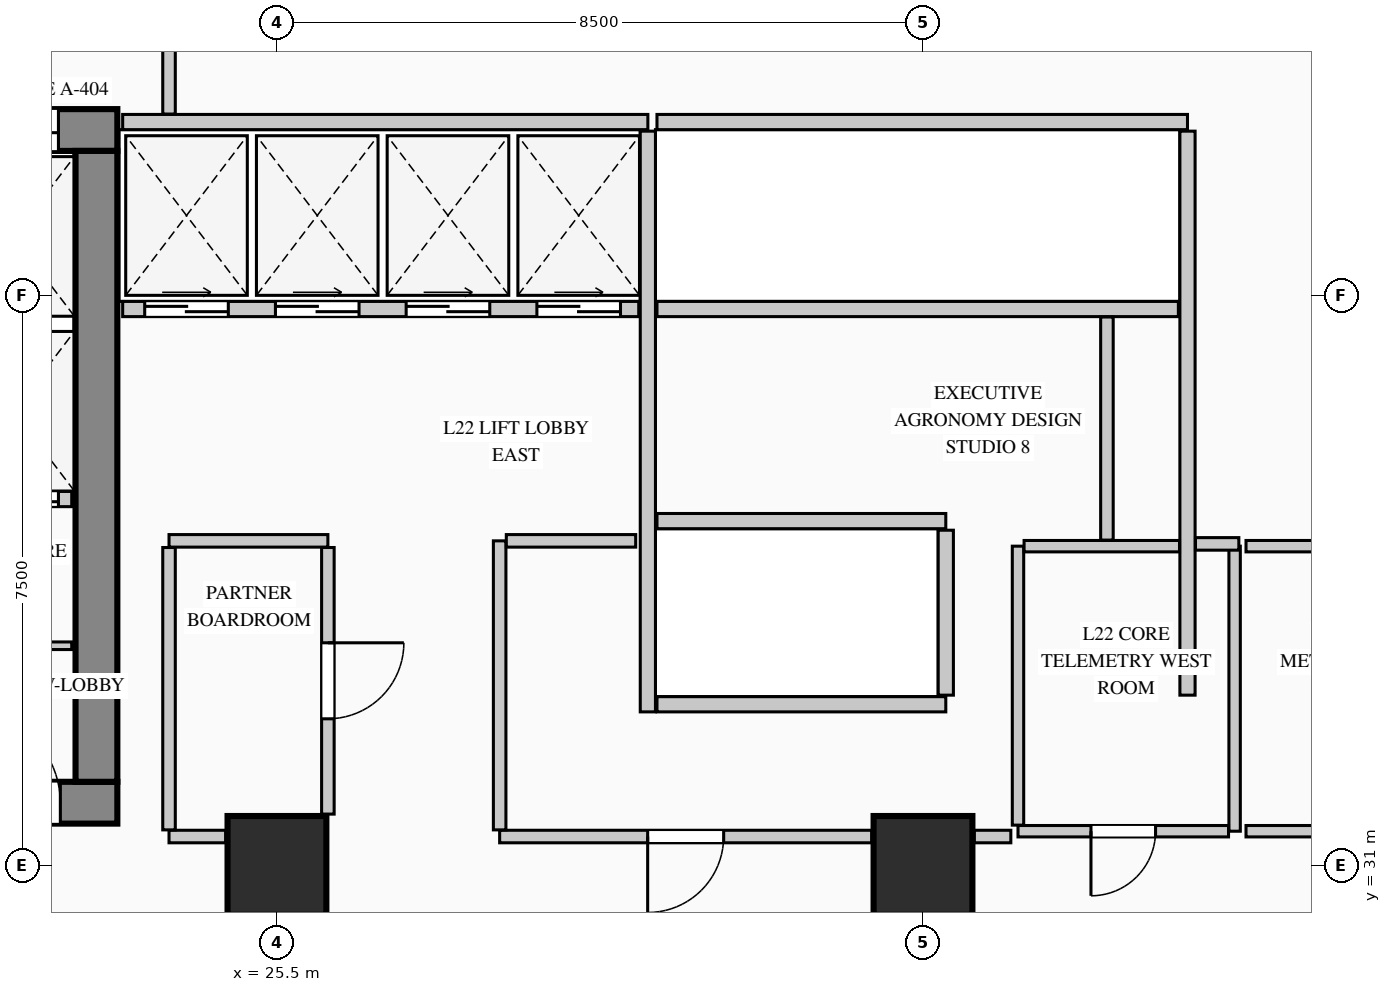
"""IFC4 building model, lengths in metres.
Left out: names, types, materials, properties, quantities, classifications, styles, units other than length and angle.
Written with IfcOpenShell. Run it as: python <this file> out.ifc"""

import sys

from ifc_helpers import new_model, si_unit, direction, frame, frame_2d, origin, origin_2d, place, context, subcontext, project, spatial, rectangle, extrude, element, fill, save


model = new_model("IFC4")
c1 = context("Model", 3, precision=1e-05, world=origin(), true_north=direction((0.0, 1.0)))
c2 = subcontext(c1, "Body", "Model", "MODEL_VIEW")
j1 = project(units=[si_unit("LENGTHUNIT", "METRE"), si_unit("PLANEANGLEUNIT", "RADIAN")], contexts=[c1])
p1 = place(None, origin())
s1 = spatial("IfcSite", under=j1, at=p1, CompositionType="ELEMENT")
p2 = place(p1, origin())
s2 = spatial("IfcBuilding", under=s1, at=p2, CompositionType="ELEMENT")
p3 = place(p2, frame((0.0, 0.0, 97.4)))
s3 = spatial("IfcBuildingStorey", under=s2, at=p3, CompositionType="ELEMENT", Elevation=97.4)
p4 = place(p3, frame((5.45, 40.675, 0.0), z_axis=(0.0, 0.0, 1.0), x_axis=(1.0, 0.0, 0.0)))
e1 = element("IfcWall", 1, at=p4, inside=s3, PredefinedType="SHEAR", context=c2, shape_type="SweptSolid", body=[
    extrude(rectangle(XDim=17.95, YDim=0.55, at=frame_2d((8.975, 0.0))), origin(), (0.0, 0.0, 1.0), 4.4),
])
p5 = place(p4, frame((15.995, 0.0, 0.0)))
e2 = element("IfcOpeningElement", 2, at=p5, cuts=e1, PredefinedType="OPENING", context=c2, shape_type="SweptSolid", body=[
    extrude(rectangle(XDim=1.18, YDim=2.25, at=frame_2d((0.59, 1.125))), frame((0.0, 0.285, 0.0), z_axis=(0.0, -1.0, 0.0), x_axis=(1.0, 0.0, 0.0)), (0.0, 0.0, 1.0), 0.57),
])
p6 = place(p3, frame((5.45, 31.825, 0.0), z_axis=(0.0, 0.0, 1.0), x_axis=(1.0, 0.0, 0.0)))
e3 = element("IfcWall", 3, at=p6, inside=s3, PredefinedType="SHEAR", context=c2, shape_type="SweptSolid", body=[
    extrude(rectangle(XDim=17.95, YDim=0.55, at=frame_2d((8.975, 0.0))), origin(), (0.0, 0.0, 1.0), 4.4),
])
p7 = place(p6, frame((3.2, 0.0, 0.0)))
e4 = element("IfcOpeningElement", 4, at=p7, cuts=e3, PredefinedType="OPENING", context=c2, shape_type="SweptSolid", body=[
    extrude(rectangle(XDim=1.2, YDim=2.2, at=frame_2d((0.6, 1.1))), frame((0.0, 0.285, 0.0), z_axis=(0.0, -1.0, 0.0), x_axis=(1.0, 0.0, 0.0)), (0.0, 0.0, 1.0), 0.57),
])
p8 = place(p6, frame((7.05, 0.0, 0.0)))
e5 = element("IfcOpeningElement", 5, at=p8, cuts=e3, PredefinedType="OPENING", context=c2, shape_type="SweptSolid", body=[
    extrude(rectangle(XDim=1.2, YDim=2.2, at=frame_2d((0.6, 1.1))), frame((0.0, 0.285, 0.0), z_axis=(0.0, -1.0, 0.0), x_axis=(1.0, 0.0, 0.0)), (0.0, 0.0, 1.0), 0.57),
])
p9 = place(p6, frame((8.9, 0.0, 0.0)))
e6 = element("IfcOpeningElement", 6, at=p9, cuts=e3, PredefinedType="OPENING", context=c2, shape_type="SweptSolid", body=[
    extrude(rectangle(XDim=1.15, YDim=2.2, at=frame_2d((0.575, 1.1))), frame((0.0, 0.285, 0.0), z_axis=(0.0, -1.0, 0.0), x_axis=(1.0, 0.0, 0.0)), (0.0, 0.0, 1.0), 0.57),
])
p10 = place(p6, frame((16.0, 0.0, 0.0)))
e7 = element("IfcOpeningElement", 7, at=p10, cuts=e3, PredefinedType="OPENING", context=c2, shape_type="SweptSolid", body=[
    extrude(rectangle(XDim=1.2, YDim=2.2, at=frame_2d((0.6, 1.1))), frame((0.0, 0.285, 0.0), z_axis=(0.0, -1.0, 0.0), x_axis=(1.0, 0.0, 0.0)), (0.0, 0.0, 1.0), 0.57),
])
p11 = place(p3, frame((23.125, 32.1, 0.0), z_axis=(0.0, 0.0, 1.0), x_axis=(0.0, 1.0, 0.0)))
e8 = element("IfcWall", 8, at=p11, inside=s3, PredefinedType="SHEAR", context=c2, shape_type="SweptSolid", body=[
    extrude(rectangle(XDim=8.3, YDim=0.55, at=frame_2d((4.15, 0.0))), origin(), (0.0, 0.0, 1.0), 4.4),
])
for number, where, z_axis, x_axis in (
    (9, (25.5, 31.0, 0.0), (0.0, 0.0, 1.0), (1.0, 0.0, 0.0)),
    (10, (34.0, 31.0, 0.0), (0.0, 0.0, 1.0), (1.0, 0.0, 0.0)),
):
    element("IfcColumn", number, at=place(p3, frame(where, z_axis=z_axis, x_axis=x_axis)), inside=s3, PredefinedType="COLUMN", context=c2, shape_type="SweptSolid", body=[
        extrude(rectangle(XDim=1.3, YDim=1.3, at=origin_2d()), origin(), (0.0, 0.0, 1.0), 4.4),
    ])
p12 = place(p3, frame((21.38, 33.89, 0.0), z_axis=(0.0, 0.0, 1.0), x_axis=(1.0, 0.0, 0.0)))
e11 = element("IfcWall", 11, at=p12, inside=s3, PredefinedType="PARTITIONING", context=c2, shape_type="SweptSolid", body=[
    extrude(rectangle(XDim=1.42, YDim=0.1, at=frame_2d((0.71, 0.0))), origin(), (0.0, 0.0, 1.0), 4.115),
])
p13 = place(p12, frame((0.28, 0.0, 0.0)))
e12 = element("IfcOpeningElement", 12, at=p13, cuts=e11, PredefinedType="OPENING", context=c2, shape_type="SweptSolid", body=[
    extrude(rectangle(XDim=0.85, YDim=2.1, at=frame_2d((0.425, 1.05))), frame((0.0, 0.06, 0.0), z_axis=(0.0, -1.0, 0.0), x_axis=(1.0, 0.0, 0.0)), (0.0, 0.0, 1.0), 0.12),
])
p14 = place(p3, frame((21.3, 35.82, 0.0), z_axis=(0.0, 0.0, 1.0), x_axis=(1.0, 0.0, 0.0)))
e13 = element("IfcWall", 13, at=p14, inside=s3, PredefinedType="PARTITIONING", context=c2, shape_type="SweptSolid", body=[
    extrude(rectangle(XDim=1.5, YDim=0.2, at=frame_2d((0.75, 0.0))), origin(), (0.0, 0.0, 1.0), 4.115),
])
p15 = place(p14, frame((0.145, 0.0, 0.0)))
e14 = element("IfcOpeningElement", 14, at=p15, cuts=e13, PredefinedType="OPENING", context=c2, shape_type="SweptSolid", body=[
    extrude(rectangle(XDim=1.18, YDim=2.25, at=frame_2d((0.59, 1.125))), frame((0.0, 0.11, 0.0), z_axis=(0.0, -1.0, 0.0), x_axis=(1.0, 0.0, 0.0)), (0.0, 0.0, 1.0), 0.22),
])
p16 = place(p3, frame((23.47, 40.78, 0.0), z_axis=(0.0, 0.0, 1.0), x_axis=(1.0, 0.0, 0.0)))
e15 = element("IfcWall", 15, at=p16, inside=s3, PredefinedType="PARTITIONING", context=c2, shape_type="SweptSolid", body=[
    extrude(rectangle(XDim=6.91, YDim=0.2, at=frame_2d((3.455, 0.0))), origin(), (0.0, 0.0, 1.0), 4.115),
])
p17 = place(p3, frame((30.38, 33.02, 0.0), z_axis=(0.0, 0.0, 1.0), x_axis=(0.0, 1.0, 0.0)))
e16 = element("IfcWall", 16, at=p17, inside=s3, PredefinedType="PARTITIONING", context=c2, shape_type="SweptSolid", body=[
    extrude(rectangle(XDim=7.64, YDim=0.2, at=frame_2d((3.82, 0.0))), origin(), (0.0, 0.0, 1.0), 4.115),
])
p18 = place(p3, frame((23.47, 38.32, 0.0), z_axis=(0.0, 0.0, 1.0), x_axis=(1.0, 0.0, 0.0)))
e17 = element("IfcWall", 17, at=p18, inside=s3, PredefinedType="PARTITIONING", context=c2, shape_type="SweptSolid", body=[
    extrude(rectangle(XDim=6.79, YDim=0.2, at=frame_2d((3.395, 0.0))), origin(), (0.0, 0.0, 1.0), 4.115),
])
p19 = place(p18, frame((0.29, 0.0, 0.0)))
e18 = element("IfcOpeningElement", 18, at=p19, cuts=e17, PredefinedType="OPENING", context=c2, shape_type="SweptSolid", body=[
    extrude(rectangle(XDim=1.1, YDim=2.2, at=frame_2d((0.55, 1.1))), frame((0.0, 0.11, 0.0), z_axis=(0.0, -1.0, 0.0), x_axis=(1.0, 0.0, 0.0)), (0.0, 0.0, 1.0), 0.22),
])
p20 = place(p18, frame((2.01, 0.0, 0.0)))
e19 = element("IfcOpeningElement", 19, at=p20, cuts=e17, PredefinedType="OPENING", context=c2, shape_type="SweptSolid", body=[
    extrude(rectangle(XDim=1.1, YDim=2.2, at=frame_2d((0.55, 1.1))), frame((0.0, 0.11, 0.0), z_axis=(0.0, -1.0, 0.0), x_axis=(1.0, 0.0, 0.0)), (0.0, 0.0, 1.0), 0.22),
])
p21 = place(p18, frame((3.73, 0.0, 0.0)))
e20 = element("IfcOpeningElement", 20, at=p21, cuts=e17, PredefinedType="OPENING", context=c2, shape_type="SweptSolid", body=[
    extrude(rectangle(XDim=1.1, YDim=2.2, at=frame_2d((0.55, 1.1))), frame((0.0, 0.11, 0.0), z_axis=(0.0, -1.0, 0.0), x_axis=(1.0, 0.0, 0.0)), (0.0, 0.0, 1.0), 0.22),
])
p22 = place(p18, frame((5.45, 0.0, 0.0)))
e21 = element("IfcOpeningElement", 21, at=p22, cuts=e17, PredefinedType="OPENING", context=c2, shape_type="SweptSolid", body=[
    extrude(rectangle(XDim=1.1, YDim=2.2, at=frame_2d((0.55, 1.1))), frame((0.0, 0.11, 0.0), z_axis=(0.0, -1.0, 0.0), x_axis=(1.0, 0.0, 0.0)), (0.0, 0.0, 1.0), 0.22),
])
p23 = place(p3, frame((30.5, 40.78, 0.0), z_axis=(0.0, 0.0, 1.0), x_axis=(1.0, 0.0, 0.0)))
e22 = element("IfcWall", 22, at=p23, inside=s3, PredefinedType="PARTITIONING", context=c2, shape_type="SweptSolid", body=[
    extrude(rectangle(XDim=6.98, YDim=0.2, at=frame_2d((3.49, 0.0))), origin(), (0.0, 0.0, 1.0), 4.115),
])
p24 = place(p3, frame((37.48, 33.24, 0.0), z_axis=(0.0, 0.0, 1.0), x_axis=(0.0, 1.0, 0.0)))
e23 = element("IfcWall", 23, at=p24, inside=s3, PredefinedType="PARTITIONING", context=c2, shape_type="SweptSolid", body=[
    extrude(rectangle(XDim=7.42, YDim=0.2, at=frame_2d((3.71, 0.0))), origin(), (0.0, 0.0, 1.0), 4.115),
])
p25 = place(p3, frame((30.5, 38.32, 0.0), z_axis=(0.0, 0.0, 1.0), x_axis=(1.0, 0.0, 0.0)))
e24 = element("IfcWall", 24, at=p25, inside=s3, PredefinedType="PARTITIONING", context=c2, shape_type="SweptSolid", body=[
    extrude(rectangle(XDim=6.86, YDim=0.2, at=frame_2d((3.43, 0.0))), origin(), (0.0, 0.0, 1.0), 4.115),
])
for number, where, z_axis, x_axis in (
    (25, (30.5, 35.53, 0.0), (0.0, 0.0, 1.0), (1.0, 0.0, 0.0)),
    (26, (30.5, 33.12, 0.0), (0.0, 0.0, 1.0), (1.0, 0.0, 0.0)),
):
    element("IfcWall", number, at=place(p3, frame(where, z_axis=z_axis, x_axis=x_axis)), inside=s3, PredefinedType="PARTITIONING", context=c2, shape_type="SweptSolid", body=[
        extrude(rectangle(XDim=3.8, YDim=0.2, at=frame_2d((1.9, 0.0))), origin(), (0.0, 0.0, 1.0), 4.115),
    ])
p26 = place(p3, frame((34.3, 33.24, 0.0), z_axis=(0.0, 0.0, 1.0), x_axis=(0.0, 1.0, 0.0)))
e27 = element("IfcWall", 27, at=p26, inside=s3, PredefinedType="PARTITIONING", context=c2, shape_type="SweptSolid", body=[
    extrude(rectangle(XDim=2.17, YDim=0.2, at=frame_2d((1.085, 0.0))), origin(), (0.0, 0.0, 1.0), 4.115),
])
p27 = place(p3, frame((38.1, 35.2, 0.0), z_axis=(0.0, 0.0, 1.0), x_axis=(0.0, -1.0, 0.0)))
e28 = element("IfcWall", 28, at=p27, inside=s3, PredefinedType="PARTITIONING", context=c2, shape_type="SweptSolid", body=[
    extrude(rectangle(XDim=3.75, YDim=0.15, at=frame_2d((1.875, 0.0))), origin(), (0.0, 0.0, 1.0), 4.115),
])
p28 = place(p3, frame((38.02, 31.45, 0.0), z_axis=(0.0, 0.0, 1.0), x_axis=(-1.0, 0.0, 0.0)))
e29 = element("IfcWall", 29, at=p28, inside=s3, PredefinedType="PARTITIONING", context=c2, shape_type="SweptSolid", body=[
    extrude(rectangle(XDim=2.77, YDim=0.15, at=frame_2d((1.385, 0.0))), origin(), (0.0, 0.0, 1.0), 4.115),
])
p29 = place(p28, frame((0.96, 0.0, 0.0)))
e30 = element("IfcOpeningElement", 30, at=p29, cuts=e29, PredefinedType="OPENING", context=c2, shape_type="SweptSolid", body=[
    extrude(rectangle(XDim=0.85, YDim=2.1, at=frame_2d((0.425, 1.05))), frame((0.0, 0.085, 0.0), z_axis=(0.0, -1.0, 0.0), x_axis=(1.0, 0.0, 0.0)), (0.0, 0.0, 1.0), 0.17),
])
p30 = place(p3, frame((35.25, 31.53, 0.0), z_axis=(0.0, 0.0, 1.0), x_axis=(0.0, 1.0, 0.0)))
e31 = element("IfcWall", 31, at=p30, inside=s3, PredefinedType="PARTITIONING", context=c2, shape_type="SweptSolid", body=[
    extrude(rectangle(XDim=3.67, YDim=0.15, at=frame_2d((1.835, 0.0))), origin(), (0.0, 0.0, 1.0), 4.115),
])
p31 = place(p3, frame((35.33, 35.2, 0.0), z_axis=(0.0, 0.0, 1.0), x_axis=(1.0, 0.0, 0.0)))
e32 = element("IfcWall", 32, at=p31, inside=s3, PredefinedType="PARTITIONING", context=c2, shape_type="SweptSolid", body=[
    extrude(rectangle(XDim=2.045, YDim=0.15, at=frame_2d((1.022, 0.0))), origin(), (0.0, 0.0, 1.0), 4.115),
])
p32 = place(p3, frame((41.07, 31.45, 0.0), z_axis=(0.0, 0.0, 1.0), x_axis=(-1.0, 0.0, 0.0)))
e33 = element("IfcWall", 33, at=p32, inside=s3, PredefinedType="PARTITIONING", context=c2, shape_type="SweptSolid", body=[
    extrude(rectangle(XDim=2.82, YDim=0.15, at=frame_2d((1.41, 0.0))), origin(), (0.0, 0.0, 1.0), 4.115),
])
p33 = place(p32, frame((0.985, 0.0, 0.0)))
e34 = element("IfcOpeningElement", 34, at=p33, cuts=e33, PredefinedType="OPENING", context=c2, shape_type="SweptSolid", body=[
    extrude(rectangle(XDim=0.85, YDim=2.1, at=frame_2d((0.425, 1.05))), frame((0.0, 0.085, 0.0), z_axis=(0.0, -1.0, 0.0), x_axis=(1.0, 0.0, 0.0)), (0.0, 0.0, 1.0), 0.17),
])
p34 = place(p3, frame((38.25, 35.2, 0.0), z_axis=(0.0, 0.0, 1.0), x_axis=(1.0, 0.0, 0.0)))
e35 = element("IfcWall", 35, at=p34, inside=s3, PredefinedType="PARTITIONING", context=c2, shape_type="SweptSolid", body=[
    extrude(rectangle(XDim=2.82, YDim=0.15, at=frame_2d((1.41, 0.0))), origin(), (0.0, 0.0, 1.0), 4.115),
])
p35 = place(p3, frame((24.08, 35.27, 0.0), z_axis=(0.0, 0.0, 1.0), x_axis=(1.0, 0.0, 0.0)))
e36 = element("IfcWall", 36, at=p35, inside=s3, PredefinedType="PARTITIONING", context=c2, shape_type="SweptSolid", body=[
    extrude(rectangle(XDim=2.09, YDim=0.165, at=frame_2d((1.045, 0.0))), origin(), (0.0, 0.0, 1.0), 4.115),
])
p36 = place(p3, frame((26.17, 35.183, 0.0), z_axis=(0.0, 0.0, 1.0), x_axis=(0.0, -1.0, 0.0)))
e37 = element("IfcWall", 37, at=p36, inside=s3, PredefinedType="PARTITIONING", context=c2, shape_type="SweptSolid", body=[
    extrude(rectangle(XDim=3.508, YDim=0.165, at=frame_2d((1.754, 0.0))), origin(), (0.0, 0.0, 1.0), 4.115),
])
p37 = place(p36, frame((1.254, 0.0, 0.0)))
e38 = element("IfcOpeningElement", 38, at=p37, cuts=e37, PredefinedType="OPENING", context=c2, shape_type="SweptSolid", body=[
    extrude(rectangle(XDim=1.0, YDim=2.15, at=frame_2d((0.5, 1.075))), frame((0.0, 0.093, 0.0), z_axis=(0.0, -1.0, 0.0), x_axis=(1.0, 0.0, 0.0)), (0.0, 0.0, 1.0), 0.185),
])
p38 = place(p3, frame((24.825, 31.38, 0.0), z_axis=(0.0, 0.0, 1.0), x_axis=(-1.0, 0.0, 0.0)))
e39 = element("IfcWall", 39, at=p38, inside=s3, PredefinedType="PARTITIONING", context=c2, shape_type="SweptSolid", body=[
    extrude(rectangle(XDim=0.745, YDim=0.165, at=frame_2d((0.373, 0.0))), origin(), (0.0, 0.0, 1.0), 4.115),
])
p39 = place(p3, frame((24.08, 31.468, 0.0), z_axis=(0.0, 0.0, 1.0), x_axis=(0.0, 1.0, 0.0)))
e40 = element("IfcWall", 40, at=p39, inside=s3, PredefinedType="PARTITIONING", context=c2, shape_type="SweptSolid", body=[
    extrude(rectangle(XDim=3.715, YDim=0.165, at=frame_2d((1.857, 0.0))), origin(), (0.0, 0.0, 1.0), 4.115),
])
p40 = place(p3, frame((36.42, 38.215, 0.0), z_axis=(0.0, 0.0, 1.0), x_axis=(0.0, -1.0, 0.0)))
e41 = element("IfcWall", 41, at=p40, inside=s3, PredefinedType="PARTITIONING", context=c2, shape_type="SweptSolid", body=[
    extrude(rectangle(XDim=2.935, YDim=0.165, at=frame_2d((1.468, 0.0))), origin(), (0.0, 0.0, 1.0), 4.115),
])
p41 = place(p3, frame((35.156, 31.38, 0.0), z_axis=(0.0, 0.0, 1.0), x_axis=(-1.0, 0.0, 0.0)))
e42 = element("IfcWall", 42, at=p41, inside=s3, PredefinedType="PARTITIONING", context=c2, shape_type="SweptSolid", body=[
    extrude(rectangle(XDim=0.48, YDim=0.165, at=frame_2d((0.24, 0.0))), origin(), (0.0, 0.0, 1.0), 4.115),
])
p42 = place(p3, frame((33.325, 31.38, 0.0), z_axis=(0.0, 0.0, 1.0), x_axis=(-1.0, 0.0, 0.0)))
e43 = element("IfcWall", 43, at=p42, inside=s3, PredefinedType="PARTITIONING", context=c2, shape_type="SweptSolid", body=[
    extrude(rectangle(XDim=4.895, YDim=0.165, at=frame_2d((2.448, 0.0))), origin(), (0.0, 0.0, 1.0), 4.115),
])
p43 = place(p42, frame((1.948, 0.0, 0.0)))
e44 = element("IfcOpeningElement", 44, at=p43, cuts=e43, PredefinedType="OPENING", context=c2, shape_type="SweptSolid", body=[
    extrude(rectangle(XDim=1.0, YDim=2.15, at=frame_2d((0.5, 1.075))), frame((0.0, 0.093, 0.0), z_axis=(0.0, -1.0, 0.0), x_axis=(1.0, 0.0, 0.0)), (0.0, 0.0, 1.0), 0.185),
])
p44 = place(p3, frame((28.43, 31.468, 0.0), z_axis=(0.0, 0.0, 1.0), x_axis=(0.0, 1.0, 0.0)))
e45 = element("IfcWall", 45, at=p44, inside=s3, PredefinedType="PARTITIONING", context=c2, shape_type="SweptSolid", body=[
    extrude(rectangle(XDim=3.802, YDim=0.165, at=frame_2d((1.901, 0.0))), origin(), (0.0, 0.0, 1.0), 4.115),
])
p45 = place(p3, frame((28.518, 35.27, 0.0), z_axis=(0.0, 0.0, 1.0), x_axis=(1.0, 0.0, 0.0)))
e46 = element("IfcWall", 46, at=p45, inside=s3, PredefinedType="PARTITIONING", context=c2, shape_type="SweptSolid", body=[
    extrude(rectangle(XDim=1.702, YDim=0.165, at=frame_2d((0.851, 0.0))), origin(), (0.0, 0.0, 1.0), 4.115),
])
p46 = place(p3, frame((24.08, 40.885, 0.0), z_axis=(0.0, 0.0, 1.0), x_axis=(0.0, 1.0, 0.0)))
e47 = element("IfcWall", 47, at=p46, inside=s3, PredefinedType="PARTITIONING", context=c2, shape_type="SweptSolid", body=[
    extrude(rectangle(XDim=2.33, YDim=0.165, at=frame_2d((1.165, 0.0))), origin(), (0.0, 0.0, 1.0), 4.115),
])
p47 = place(p3, frame((38.156, 35.23, 0.0), z_axis=(0.0, 0.0, 1.0), x_axis=(-1.0, 0.0, 0.0)))
e48 = element("IfcWall", 48, at=p47, inside=s3, PredefinedType="PARTITIONING", context=c2, shape_type="SweptSolid", body=[
    extrude(rectangle(XDim=0.571, YDim=0.165, at=frame_2d((0.285, 0.0))), origin(), (0.0, 0.0, 1.0), 4.115),
])
p48 = place(p10, origin())
e49 = element("IfcDoor", 49, at=p48, inside=s3, OperationType="SINGLE_SWING_LEFT", PredefinedType="DOOR", context=c2, shape_type="SweptSolid", body=[
    extrude(rectangle(XDim=1.2, YDim=2.2, at=frame_2d((0.6, 1.1))), frame((0.0, 0.025, 0.0), z_axis=(0.0, -1.0, 0.0), x_axis=(1.0, 0.0, 0.0)), (0.0, 0.0, 1.0), 0.05),
])
fill(e7, e49)
p49 = place(p5, origin())
e50 = element("IfcDoor", 50, at=p49, inside=s3, OperationType="DOUBLE_DOOR_SLIDING", PredefinedType="DOOR", context=c2, shape_type="SweptSolid", body=[
    extrude(rectangle(XDim=1.18, YDim=2.25, at=frame_2d((0.59, 1.125))), frame((0.0, 0.025, 0.0), z_axis=(0.0, -1.0, 0.0), x_axis=(1.0, 0.0, 0.0)), (0.0, 0.0, 1.0), 0.05),
])
fill(e2, e50)
p50 = place(p15, origin())
e51 = element("IfcDoor", 51, at=p50, inside=s3, OperationType="DOUBLE_DOOR_SLIDING", PredefinedType="DOOR", context=c2, shape_type="SweptSolid", body=[
    extrude(rectangle(XDim=1.18, YDim=2.25, at=frame_2d((0.59, 1.125))), frame((0.0, 0.025, 0.0), z_axis=(0.0, -1.0, 0.0), x_axis=(1.0, 0.0, 0.0)), (0.0, 0.0, 1.0), 0.05),
])
fill(e14, e51)
p51 = place(p19, origin())
e52 = element("IfcDoor", 52, at=p51, inside=s3, OperationType="DOUBLE_DOOR_SLIDING", PredefinedType="DOOR", context=c2, shape_type="SweptSolid", body=[
    extrude(rectangle(XDim=1.1, YDim=2.2, at=frame_2d((0.55, 1.1))), frame((0.0, 0.025, 0.0), z_axis=(0.0, -1.0, 0.0), x_axis=(1.0, 0.0, 0.0)), (0.0, 0.0, 1.0), 0.05),
])
fill(e18, e52)
p52 = place(p20, origin())
e53 = element("IfcDoor", 53, at=p52, inside=s3, OperationType="DOUBLE_DOOR_SLIDING", PredefinedType="DOOR", context=c2, shape_type="SweptSolid", body=[
    extrude(rectangle(XDim=1.1, YDim=2.2, at=frame_2d((0.55, 1.1))), frame((0.0, 0.025, 0.0), z_axis=(0.0, -1.0, 0.0), x_axis=(1.0, 0.0, 0.0)), (0.0, 0.0, 1.0), 0.05),
])
fill(e19, e53)
p53 = place(p21, origin())
e54 = element("IfcDoor", 54, at=p53, inside=s3, OperationType="DOUBLE_DOOR_SLIDING", PredefinedType="DOOR", context=c2, shape_type="SweptSolid", body=[
    extrude(rectangle(XDim=1.1, YDim=2.2, at=frame_2d((0.55, 1.1))), frame((0.0, 0.025, 0.0), z_axis=(0.0, -1.0, 0.0), x_axis=(1.0, 0.0, 0.0)), (0.0, 0.0, 1.0), 0.05),
])
fill(e20, e54)
p54 = place(p22, origin())
e55 = element("IfcDoor", 55, at=p54, inside=s3, OperationType="DOUBLE_DOOR_SLIDING", PredefinedType="DOOR", context=c2, shape_type="SweptSolid", body=[
    extrude(rectangle(XDim=1.1, YDim=2.2, at=frame_2d((0.55, 1.1))), frame((0.0, 0.025, 0.0), z_axis=(0.0, -1.0, 0.0), x_axis=(1.0, 0.0, 0.0)), (0.0, 0.0, 1.0), 0.05),
])
fill(e21, e55)
p55 = place(p29, origin())
e56 = element("IfcDoor", 56, at=p55, inside=s3, OperationType="SINGLE_SWING_RIGHT", PredefinedType="DOOR", context=c2, shape_type="SweptSolid", body=[
    extrude(rectangle(XDim=0.85, YDim=2.1, at=frame_2d((0.425, 1.05))), frame((0.0, 0.025, 0.0), z_axis=(0.0, -1.0, 0.0), x_axis=(1.0, 0.0, 0.0)), (0.0, 0.0, 1.0), 0.05),
])
fill(e30, e56)
p56 = place(p37, origin())
e57 = element("IfcDoor", 57, at=p56, inside=s3, OperationType="SINGLE_SWING_LEFT", PredefinedType="DOOR", context=c2, shape_type="SweptSolid", body=[
    extrude(rectangle(XDim=1.0, YDim=2.15, at=frame_2d((0.5, 1.075))), frame((0.0, 0.025, 0.0), z_axis=(0.0, -1.0, 0.0), x_axis=(1.0, 0.0, 0.0)), (0.0, 0.0, 1.0), 0.05),
])
fill(e38, e57)
p57 = place(p43, origin())
e58 = element("IfcDoor", 58, at=p57, inside=s3, OperationType="SINGLE_SWING_RIGHT", PredefinedType="DOOR", context=c2, shape_type="SweptSolid", body=[
    extrude(rectangle(XDim=1.0, YDim=2.15, at=frame_2d((0.5, 1.075))), frame((0.0, 0.025, 0.0), z_axis=(0.0, -1.0, 0.0), x_axis=(1.0, 0.0, 0.0)), (0.0, 0.0, 1.0), 0.05),
])
fill(e44, e58)
save(model, sys.argv[1])
